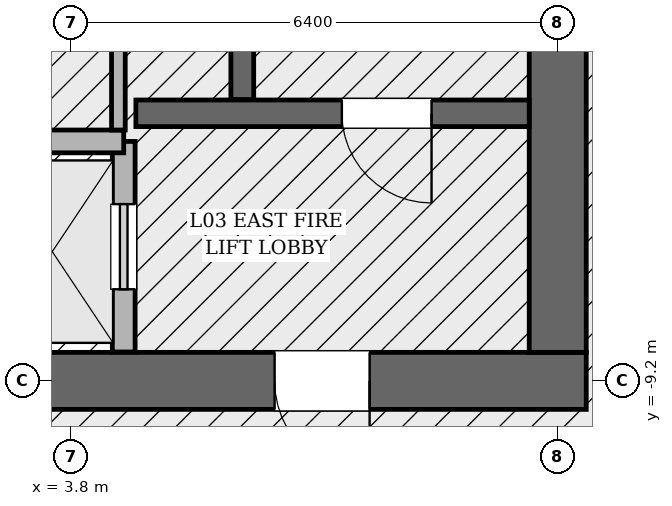
"""IFC4 building model, lengths in metres.
Left out: names, types, materials, properties, quantities, classifications, styles, units other than length and angle.
Written with IfcOpenShell. Run it as: python <this file> out.ifc"""

import sys

from ifc_helpers import new_model, si_unit, direction, frame, frame_2d, origin, place, context, subcontext, project, spatial, rectangle, extrude, element, fill, save


model = new_model("IFC4")
c1 = context("Model", 3, precision=1e-05, world=origin(), true_north=direction((0.0, 1.0)))
c2 = subcontext(c1, "Body", "Model", "MODEL_VIEW")
j1 = project(units=[si_unit("LENGTHUNIT", "METRE"), si_unit("PLANEANGLEUNIT", "RADIAN")], contexts=[c1])
p1 = place(None, origin())
s1 = spatial("IfcSite", under=j1, at=p1, CompositionType="ELEMENT")
p2 = place(p1, origin())
s2 = spatial("IfcBuilding", under=s1, at=p2, CompositionType="ELEMENT")
p3 = place(p2, frame((0.0, 0.0, 16.8)))
s3 = spatial("IfcBuildingStorey", under=s2, at=p3, CompositionType="ELEMENT", Elevation=16.8)
p4 = place(p3, frame((10.575, -9.2, 0.0), z_axis=(0.0, 0.0, 1.0), x_axis=(-1.0, 0.0, 0.0)))
e1 = element("IfcWall", 1, at=p4, inside=s3, PredefinedType="SHEAR", context=c2, shape_type="SweptSolid", body=[
    extrude(rectangle(XDim=21.15, YDim=0.75, at=frame_2d((10.575, 0.0))), origin(), (0.0, 0.0, 1.0), 5.4),
])
p5 = place(p4, frame((2.85, 0.0, 0.0)))
e2 = element("IfcOpeningElement", 2, at=p5, cuts=e1, PredefinedType="OPENING", context=c2, shape_type="SweptSolid", body=[
    extrude(rectangle(XDim=1.25, YDim=2.25, at=frame_2d((0.625, 1.125))), frame((0.0, 0.385, 0.0), z_axis=(0.0, -1.0, 0.0), x_axis=(1.0, 0.0, 0.0)), (0.0, 0.0, 1.0), 0.77),
])
p6 = place(p4, frame((17.05, 0.0, 0.0)))
e3 = element("IfcOpeningElement", 3, at=p6, cuts=e1, PredefinedType="OPENING", context=c2, shape_type="SweptSolid", body=[
    extrude(rectangle(XDim=1.25, YDim=2.25, at=frame_2d((0.625, 1.125))), frame((0.0, 0.385, 0.0), z_axis=(0.0, -1.0, 0.0), x_axis=(1.0, 0.0, 0.0)), (0.0, 0.0, 1.0), 0.77),
])
p7 = place(p3, frame((10.2, 8.825, 0.0), z_axis=(0.0, 0.0, 1.0), x_axis=(0.0, -1.0, 0.0)))
e4 = element("IfcWall", 4, at=p7, inside=s3, PredefinedType="SHEAR", context=c2, shape_type="SweptSolid", body=[
    extrude(rectangle(XDim=17.65, YDim=0.75, at=frame_2d((8.825, 0.0))), origin(), (0.0, 0.0, 1.0), 5.4),
])
p8 = place(p7, frame((3.855, 0.0, 0.0)))
e5 = element("IfcOpeningElement", 5, at=p8, cuts=e4, PredefinedType="OPENING", context=c2, shape_type="SweptSolid", body=[
    extrude(rectangle(XDim=1.18, YDim=2.2, at=frame_2d((0.59, 1.1))), frame((0.0, 0.385, 0.0), z_axis=(0.0, -1.0, 0.0), x_axis=(1.0, 0.0, 0.0)), (0.0, 0.0, 1.0), 0.77),
])
p9 = place(p3, frame((6.05, 3.45, 0.0), z_axis=(0.0, 0.0, 1.0), x_axis=(0.0, -1.0, 0.0)))
e6 = element("IfcWall", 6, at=p9, inside=s3, PredefinedType="SOLIDWALL", context=c2, shape_type="SweptSolid", body=[
    extrude(rectangle(XDim=8.95, YDim=0.3, at=frame_2d((4.475, 0.0))), origin(), (0.0, 0.0, 1.0), 5.4),
])
p10 = place(p3, frame((4.65, -5.68, 0.0), z_axis=(0.0, 0.0, 1.0), x_axis=(1.0, 0.0, 0.0)))
e7 = element("IfcWall", 7, at=p10, inside=s3, PredefinedType="SOLIDWALL", context=c2, shape_type="SweptSolid", body=[
    extrude(rectangle(XDim=5.175, YDim=0.35, at=frame_2d((2.587, 0.0))), origin(), (0.0, 0.0, 1.0), 5.4),
])
p11 = place(p10, frame((2.71, 0.0, 0.0)))
e8 = element("IfcOpeningElement", 8, at=p11, cuts=e7, PredefinedType="OPENING", context=c2, shape_type="SweptSolid", body=[
    extrude(rectangle(XDim=1.18, YDim=2.2, at=frame_2d((0.59, 1.1))), frame((0.0, 0.185, 0.0), z_axis=(0.0, -1.0, 0.0), x_axis=(1.0, 0.0, 0.0)), (0.0, 0.0, 1.0), 0.37),
])
p12 = place(p3, frame((4.49, -8.82, 0.0), z_axis=(0.0, 0.0, 1.0), x_axis=(0.0, 1.0, 0.0)))
e9 = element("IfcWall", 9, at=p12, inside=s3, PredefinedType="SOLIDWALL", context=c2, shape_type="SweptSolid", body=[
    extrude(rectangle(XDim=2.77, YDim=0.3, at=frame_2d((1.385, 0.0))), origin(), (0.0, 0.0, 1.0), 5.02),
])
p13 = place(p12, frame((0.825, 0.0, 0.0)))
e10 = element("IfcOpeningElement", 10, at=p13, cuts=e9, PredefinedType="OPENING", context=c2, shape_type="SweptSolid", body=[
    extrude(rectangle(XDim=1.12, YDim=2.25, at=frame_2d((0.56, 1.125))), frame((0.0, 0.16, 0.0), z_axis=(0.0, -1.0, 0.0), x_axis=(1.0, 0.0, 0.0)), (0.0, 0.0, 1.0), 0.32),
])
p14 = place(p3, frame((2.61, -6.05, 0.0), z_axis=(0.0, 0.0, 1.0), x_axis=(1.0, 0.0, 0.0)))
e11 = element("IfcWall", 11, at=p14, inside=s3, PredefinedType="SOLIDWALL", context=c2, shape_type="SweptSolid", body=[
    extrude(rectangle(XDim=1.88, YDim=0.3, at=frame_2d((0.94, 0.0))), origin(), (0.0, 0.0, 1.0), 5.02),
])
p15 = place(p3, frame((4.42, -5.9, 0.0), z_axis=(0.0, 0.0, 1.0), x_axis=(0.0, 1.0, 0.0)))
e12 = element("IfcWall", 12, at=p15, inside=s3, PredefinedType="PARTITIONING", context=c2, shape_type="SweptSolid", body=[
    extrude(rectangle(XDim=1.74, YDim=0.18, at=frame_2d((0.87, 0.0))), origin(), (0.0, 0.0, 1.0), 5.02),
])
p16 = place(p11, origin())
e13 = element("IfcDoor", 13, at=p16, inside=s3, OperationType="SINGLE_SWING_RIGHT", PredefinedType="DOOR", context=c2, shape_type="SweptSolid", body=[
    extrude(rectangle(XDim=1.18, YDim=2.2, at=frame_2d((0.59, 1.1))), frame((0.0, 0.025, 0.0), z_axis=(0.0, -1.0, 0.0), x_axis=(1.0, 0.0, 0.0)), (0.0, 0.0, 1.0), 0.05),
])
fill(e8, e13)
p17 = place(p5, origin())
e14 = element("IfcDoor", 14, at=p17, inside=s3, OperationType="SINGLE_SWING_LEFT", PredefinedType="DOOR", context=c2, shape_type="SweptSolid", body=[
    extrude(rectangle(XDim=1.25, YDim=2.25, at=frame_2d((0.625, 1.125))), frame((0.0, 0.025, 0.0), z_axis=(0.0, -1.0, 0.0), x_axis=(1.0, 0.0, 0.0)), (0.0, 0.0, 1.0), 0.05),
])
fill(e2, e14)
p18 = place(p13, origin())
e15 = element("IfcDoor", 15, at=p18, inside=s3, OperationType="SLIDING_TO_RIGHT", PredefinedType="DOOR", context=c2, shape_type="SweptSolid", body=[
    extrude(rectangle(XDim=1.12, YDim=2.25, at=frame_2d((0.56, 1.125))), frame((0.0, 0.025, 0.0), z_axis=(0.0, -1.0, 0.0), x_axis=(1.0, 0.0, 0.0)), (0.0, 0.0, 1.0), 0.05),
])
fill(e10, e15)
save(model, sys.argv[1])
